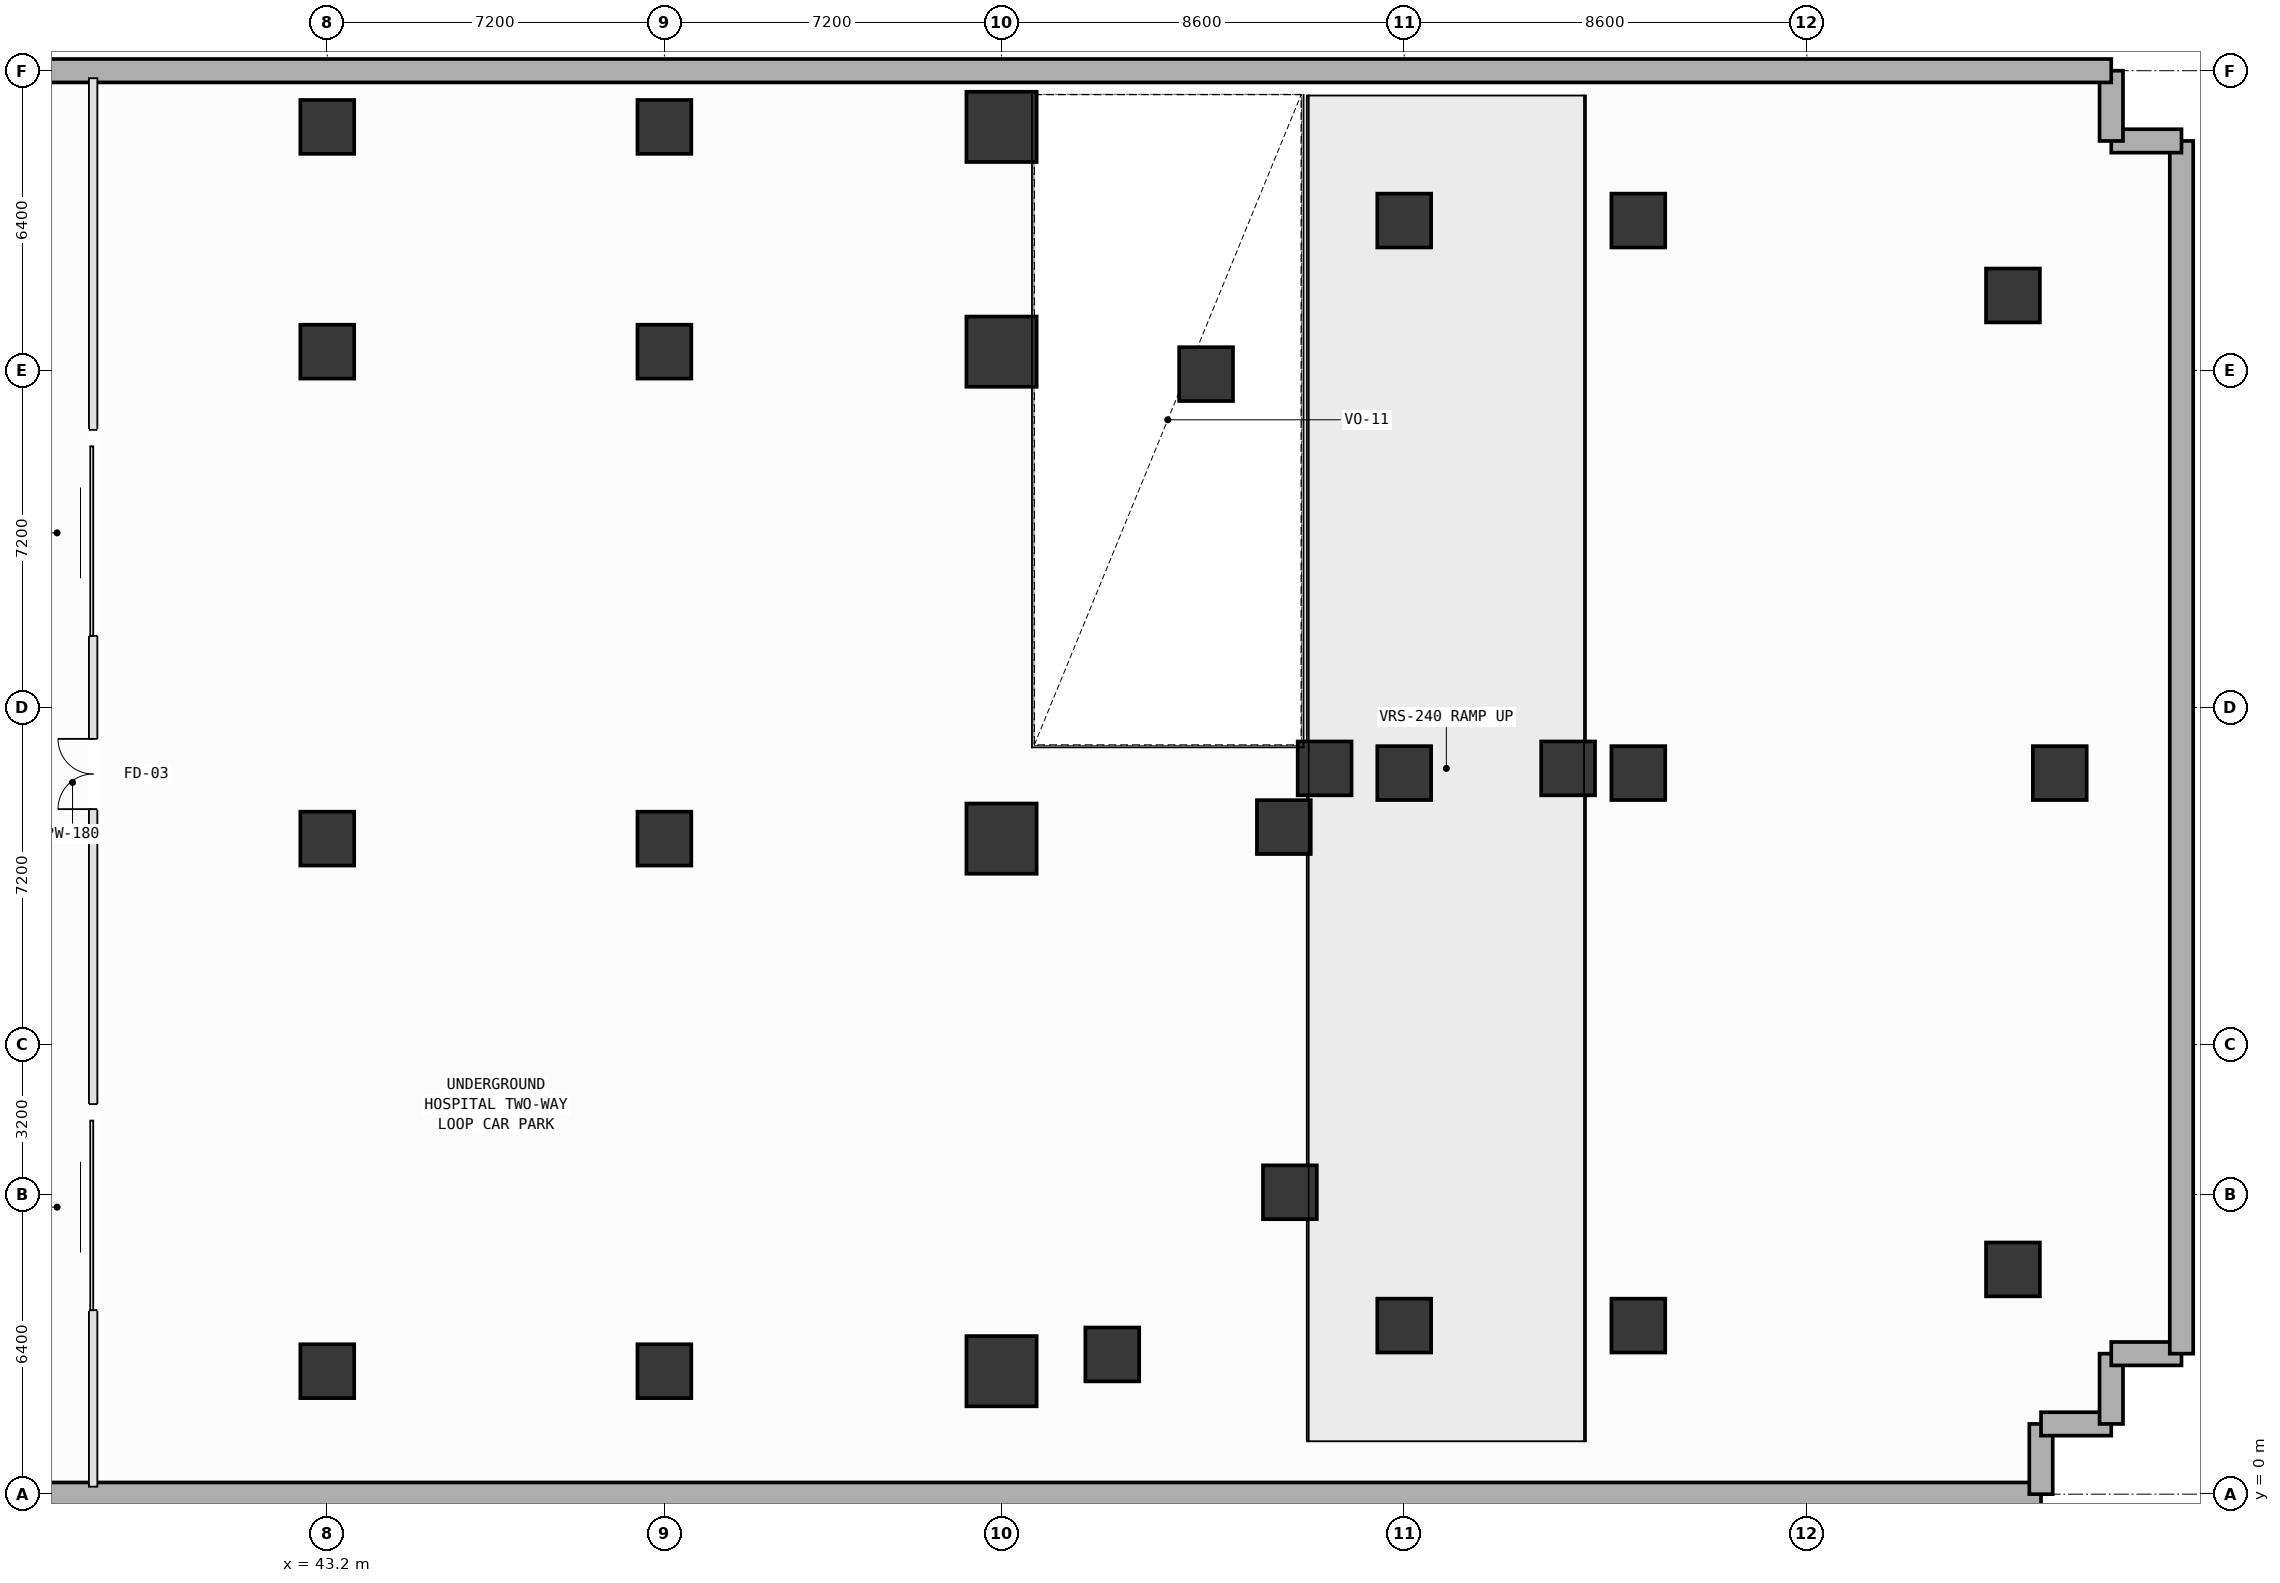
"""IFC4 building model, lengths in metres.
Left out: names, types, materials, properties, quantities, classifications, styles, units other than length and angle.
Written with IfcOpenShell. Run it as: python <this file> out.ifc"""

import sys

from ifc_helpers import new_model, si_unit, direction, frame, frame_2d, origin, origin_2d, place, context, subcontext, project, spatial, rectangle, extrude, element, fill, save


model = new_model("IFC4")
c1 = context("Model", 3, precision=1e-05, world=origin(), true_north=direction((0.0, 1.0)))
c2 = subcontext(c1, "Body", "Model", "MODEL_VIEW")
j1 = project(units=[si_unit("LENGTHUNIT", "METRE"), si_unit("PLANEANGLEUNIT", "RADIAN")], contexts=[c1])
p1 = place(None, origin())
s1 = spatial("IfcSite", under=j1, at=p1, CompositionType="ELEMENT")
p2 = place(p1, origin())
s2 = spatial("IfcBuilding", under=s1, at=p2, CompositionType="ELEMENT")
p3 = place(p2, frame((0.0, 0.0, -4.8)))
s3 = spatial("IfcBuildingStorey", under=s2, at=p3, CompositionType="ELEMENT", Elevation=-4.8)
for number, where, z_axis, x_axis in (
    (1, (64.5, 15.5, 0.002), (0.0, 0.0, 1.0), (1.0, 0.0, 0.0)),
    (2, (69.7, 15.5, 0.002), (0.0, 0.0, 1.0), (1.0, 0.0, 0.0)),
):
    element("IfcColumn", number, at=place(p3, frame(where, z_axis=z_axis, x_axis=x_axis)), inside=s3, PredefinedType="COLUMN", context=c2, shape_type="SweptSolid", body=[
        extrude(rectangle(XDim=1.15, YDim=1.15, at=origin_2d()), origin(), (0.0, 0.0, 1.0), 2.27),
    ])
p4 = place(p3, frame((57.6, 2.626, 0.0), z_axis=(0.0, 0.0, 1.0), x_axis=(1.0, 0.0, 0.0)))
e3 = element("IfcColumn", 3, at=p4, inside=s3, PredefinedType="PILASTER", context=c2, shape_type="SweptSolid", body=[
    extrude(rectangle(XDim=1.5, YDim=1.5, at=origin_2d()), origin(), (0.0, 0.0, 1.0), 4.8),
])
for number, where, z_axis, x_axis in (
    (4, (43.2, 2.626, 0.0), (0.0, 0.0, 1.0), (1.0, 0.0, 0.0)),
    (5, (50.4, 2.626, 0.0), (0.0, 0.0, 1.0), (1.0, 0.0, 0.0)),
):
    element("IfcColumn", number, at=place(p3, frame(where, z_axis=z_axis, x_axis=x_axis)), inside=s3, PredefinedType="COLUMN", context=c2, shape_type="SweptSolid", body=[
        extrude(rectangle(XDim=1.15, YDim=1.15, at=origin_2d()), origin(), (0.0, 0.0, 1.0), 4.8),
    ])
p5 = place(p3, frame((57.6, 14.0, 0.0), z_axis=(0.0, 0.0, 1.0), x_axis=(1.0, 0.0, 0.0)))
e6 = element("IfcColumn", 6, at=p5, inside=s3, PredefinedType="PILASTER", context=c2, shape_type="SweptSolid", body=[
    extrude(rectangle(XDim=1.5, YDim=1.5, at=origin_2d()), origin(), (0.0, 0.0, 1.0), 4.8),
])
for number, where, z_axis, x_axis in (
    (7, (43.2, 14.0, 0.0), (0.0, 0.0, 1.0), (1.0, 0.0, 0.0)),
    (8, (50.4, 14.0, 0.0), (0.0, 0.0, 1.0), (1.0, 0.0, 0.0)),
):
    element("IfcColumn", number, at=place(p3, frame(where, z_axis=z_axis, x_axis=x_axis)), inside=s3, PredefinedType="COLUMN", context=c2, shape_type="SweptSolid", body=[
        extrude(rectangle(XDim=1.15, YDim=1.15, at=origin_2d()), origin(), (0.0, 0.0, 1.0), 4.8),
    ])
p6 = place(p3, frame((57.6, 24.4, 0.0), z_axis=(0.0, 0.0, 1.0), x_axis=(1.0, 0.0, 0.0)))
e9 = element("IfcColumn", 9, at=p6, inside=s3, PredefinedType="PILASTER", context=c2, shape_type="SweptSolid", body=[
    extrude(rectangle(XDim=1.5, YDim=1.5, at=origin_2d()), origin(), (0.0, 0.0, 1.0), 4.8),
])
for number, where, z_axis, x_axis in (
    (10, (43.2, 24.4, 0.0), (0.0, 0.0, 1.0), (1.0, 0.0, 0.0)),
    (11, (50.4, 24.4, 0.0), (0.0, 0.0, 1.0), (1.0, 0.0, 0.0)),
):
    element("IfcColumn", number, at=place(p3, frame(where, z_axis=z_axis, x_axis=x_axis)), inside=s3, PredefinedType="COLUMN", context=c2, shape_type="SweptSolid", body=[
        extrude(rectangle(XDim=1.15, YDim=1.15, at=origin_2d()), origin(), (0.0, 0.0, 1.0), 4.8),
    ])
p7 = place(p3, frame((57.6, 29.2, 0.0), z_axis=(0.0, 0.0, 1.0), x_axis=(1.0, 0.0, 0.0)))
e12 = element("IfcColumn", 12, at=p7, inside=s3, PredefinedType="PILASTER", context=c2, shape_type="SweptSolid", body=[
    extrude(rectangle(XDim=1.5, YDim=1.5, at=origin_2d()), origin(), (0.0, 0.0, 1.0), 4.8),
])
for number, where, z_axis, x_axis in (
    (13, (43.2, 29.2, 0.0), (0.0, 0.0, 1.0), (1.0, 0.0, 0.0)),
    (14, (50.4, 29.2, 0.0), (0.0, 0.0, 1.0), (1.0, 0.0, 0.0)),
    (15, (59.965, 2.984, 0.0), (0.0, 0.0, 1.0), (1.0, 0.0, 0.0)),
    (16, (63.758, 6.448, 0.0), (0.0, 0.0, 1.0), (1.0, 0.0, 0.0)),
    (17, (63.629, 14.246, 0.0), (0.0, 0.0, 1.0), (1.0, 0.0, 0.0)),
    (18, (61.969, 23.92, 0.0), (0.0, 0.0, 1.0), (1.0, 0.0, 0.0)),
    (19, (66.2, 3.6, 0.0), (0.0, 0.0, 1.0), (1.0, 0.0, 0.0)),
    (20, (71.2, 3.6, 0.0), (0.0, 0.0, 1.0), (1.0, 0.0, 0.0)),
    (21, (66.2, 15.4, 0.0), (0.0, 0.0, 1.0), (1.0, 0.0, 0.0)),
    (22, (71.2, 15.4, 0.0), (0.0, 0.0, 1.0), (1.0, 0.0, 0.0)),
    (23, (66.2, 27.2, 0.0), (0.0, 0.0, 1.0), (1.0, 0.0, 0.0)),
    (24, (71.2, 27.2, 0.0), (0.0, 0.0, 1.0), (1.0, 0.0, 0.0)),
    (25, (79.2, 4.8, 0.0), (0.0, 0.0, 1.0), (1.0, 0.0, 0.0)),
    (26, (80.2, 15.4, 0.0), (0.0, 0.0, 1.0), (1.0, 0.0, 0.0)),
    (27, (79.2, 25.6, 0.0), (0.0, 0.0, 1.0), (1.0, 0.0, 0.0)),
):
    element("IfcColumn", number, at=place(p3, frame(where, z_axis=z_axis, x_axis=x_axis)), inside=s3, PredefinedType="COLUMN", context=c2, shape_type="SweptSolid", body=[
        extrude(rectangle(XDim=1.15, YDim=1.15, at=origin_2d()), origin(), (0.0, 0.0, 1.0), 4.8),
    ])
p8 = place(p3, frame((79.8, 0.0, 0.0), z_axis=(0.0, 0.0, 1.0), x_axis=(-1.0, 0.0, 0.0)))
e28 = element("IfcWall", 28, at=p8, inside=s3, PredefinedType="USERDEFINED", context=c2, shape_type="SweptSolid", body=[
    extrude(rectangle(XDim=76.8, YDim=0.5, at=frame_2d((38.4, 0.0))), origin(), (0.0, 0.0, 1.0), 4.55),
])
for number, where, z_axis, x_axis in (
    (29, (79.8, 1.5, 0.0), (0.0, 0.0, 1.0), (0.0, -1.0, 0.0)),
    (30, (81.3, 1.5, 0.0), (0.0, 0.0, 1.0), (-1.0, 0.0, 0.0)),
    (31, (81.3, 3.0, 0.0), (0.0, 0.0, 1.0), (0.0, -1.0, 0.0)),
    (32, (82.8, 3.0, 0.0), (0.0, 0.0, 1.0), (-1.0, 0.0, 0.0)),
):
    element("IfcWall", number, at=place(p3, frame(where, z_axis=z_axis, x_axis=x_axis)), inside=s3, PredefinedType="USERDEFINED", context=c2, shape_type="SweptSolid", body=[
        extrude(rectangle(XDim=1.5, YDim=0.5, at=frame_2d((0.75, 0.0))), origin(), (0.0, 0.0, 1.0), 4.55),
    ])
p9 = place(p3, frame((82.8, 28.9, 0.0), z_axis=(0.0, 0.0, 1.0), x_axis=(0.0, -1.0, 0.0)))
e33 = element("IfcWall", 33, at=p9, inside=s3, PredefinedType="USERDEFINED", context=c2, shape_type="SweptSolid", body=[
    extrude(rectangle(XDim=25.9, YDim=0.5, at=frame_2d((12.95, 0.0))), origin(), (0.0, 0.0, 1.0), 4.55),
])
for number, where, z_axis, x_axis in (
    (34, (81.3, 28.9, 0.0), (0.0, 0.0, 1.0), (1.0, 0.0, 0.0)),
    (35, (81.3, 30.4, 0.0), (0.0, 0.0, 1.0), (0.0, -1.0, 0.0)),
):
    element("IfcWall", number, at=place(p3, frame(where, z_axis=z_axis, x_axis=x_axis)), inside=s3, PredefinedType="USERDEFINED", context=c2, shape_type="SweptSolid", body=[
        extrude(rectangle(XDim=1.5, YDim=0.5, at=frame_2d((0.75, 0.0))), origin(), (0.0, 0.0, 1.0), 4.55),
    ])
p10 = place(p3, frame((32.0, 30.4, 0.0), z_axis=(0.0, 0.0, 1.0), x_axis=(1.0, 0.0, 0.0)))
e36 = element("IfcWall", 36, at=p10, inside=s3, PredefinedType="USERDEFINED", context=c2, shape_type="SweptSolid", body=[
    extrude(rectangle(XDim=49.3, YDim=0.5, at=frame_2d((24.65, 0.0))), origin(), (0.0, 0.0, 1.0), 4.55),
])
p11 = place(p3, frame((38.2, 0.16, 0.0), z_axis=(0.0, 0.0, 1.0), x_axis=(0.0, 1.0, 0.0)))
e37 = element("IfcWall", 37, at=p11, inside=s3, PredefinedType="PARTITIONING", context=c2, shape_type="SweptSolid", body=[
    extrude(rectangle(XDim=30.08, YDim=0.18, at=frame_2d((15.04, 0.0))), origin(), (0.0, 0.0, 1.0), 4.55),
])
p12 = place(p11, frame((18.17, 0.0, 0.0)))
e38 = element("IfcOpeningElement", 38, at=p12, cuts=e37, PredefinedType="OPENING", context=c2, shape_type="SweptSolid", body=[
    extrude(rectangle(XDim=4.4, YDim=3.3, at=frame_2d((2.2, 1.65))), frame((0.0, 0.1, 0.0), z_axis=(0.0, -1.0, 0.0), x_axis=(1.0, 0.0, 0.0)), (0.0, 0.0, 1.0), 0.2),
])
p13 = place(p11, frame((14.47, 0.0, 0.0)))
e39 = element("IfcOpeningElement", 39, at=p13, cuts=e37, PredefinedType="OPENING", context=c2, shape_type="SweptSolid", body=[
    extrude(rectangle(XDim=1.5, YDim=2.2, at=frame_2d((0.75, 1.1))), frame((0.0, 0.1, 0.0), z_axis=(0.0, -1.0, 0.0), x_axis=(1.0, 0.0, 0.0)), (0.0, 0.0, 1.0), 0.2),
])
p14 = place(p11, frame((3.77, 0.0, 0.0)))
e40 = element("IfcOpeningElement", 40, at=p14, cuts=e37, PredefinedType="OPENING", context=c2, shape_type="SweptSolid", body=[
    extrude(rectangle(XDim=4.4, YDim=3.3, at=frame_2d((2.2, 1.65))), frame((0.0, 0.1, 0.0), z_axis=(0.0, -1.0, 0.0), x_axis=(1.0, 0.0, 0.0)), (0.0, 0.0, 1.0), 0.2),
])
p15 = place(p12, origin())
e41 = element("IfcDoor", 41, at=p15, inside=s3, OperationType="ROLLINGUP", PredefinedType="GATE", context=c2, shape_type="SweptSolid", body=[
    extrude(rectangle(XDim=4.4, YDim=3.3, at=frame_2d((2.2, 1.65))), frame((0.0, 0.025, 0.0), z_axis=(0.0, -1.0, 0.0), x_axis=(1.0, 0.0, 0.0)), (0.0, 0.0, 1.0), 0.05),
])
fill(e38, e41)
p16 = place(p13, origin())
e42 = element("IfcDoor", 42, at=p16, inside=s3, OperationType="DOUBLE_DOOR_SINGLE_SWING", PredefinedType="DOOR", context=c2, shape_type="SweptSolid", body=[
    extrude(rectangle(XDim=1.5, YDim=2.2, at=frame_2d((0.75, 1.1))), frame((0.0, 0.025, 0.0), z_axis=(0.0, -1.0, 0.0), x_axis=(1.0, 0.0, 0.0)), (0.0, 0.0, 1.0), 0.05),
])
fill(e39, e42)
p17 = place(p14, origin())
e43 = element("IfcDoor", 43, at=p17, inside=s3, OperationType="ROLLINGUP", PredefinedType="GATE", context=c2, shape_type="SweptSolid", body=[
    extrude(rectangle(XDim=4.4, YDim=3.3, at=frame_2d((2.2, 1.65))), frame((0.0, 0.025, 0.0), z_axis=(0.0, -1.0, 0.0), x_axis=(1.0, 0.0, 0.0)), (0.0, 0.0, 1.0), 0.05),
])
fill(e40, e43)
save(model, sys.argv[1])
